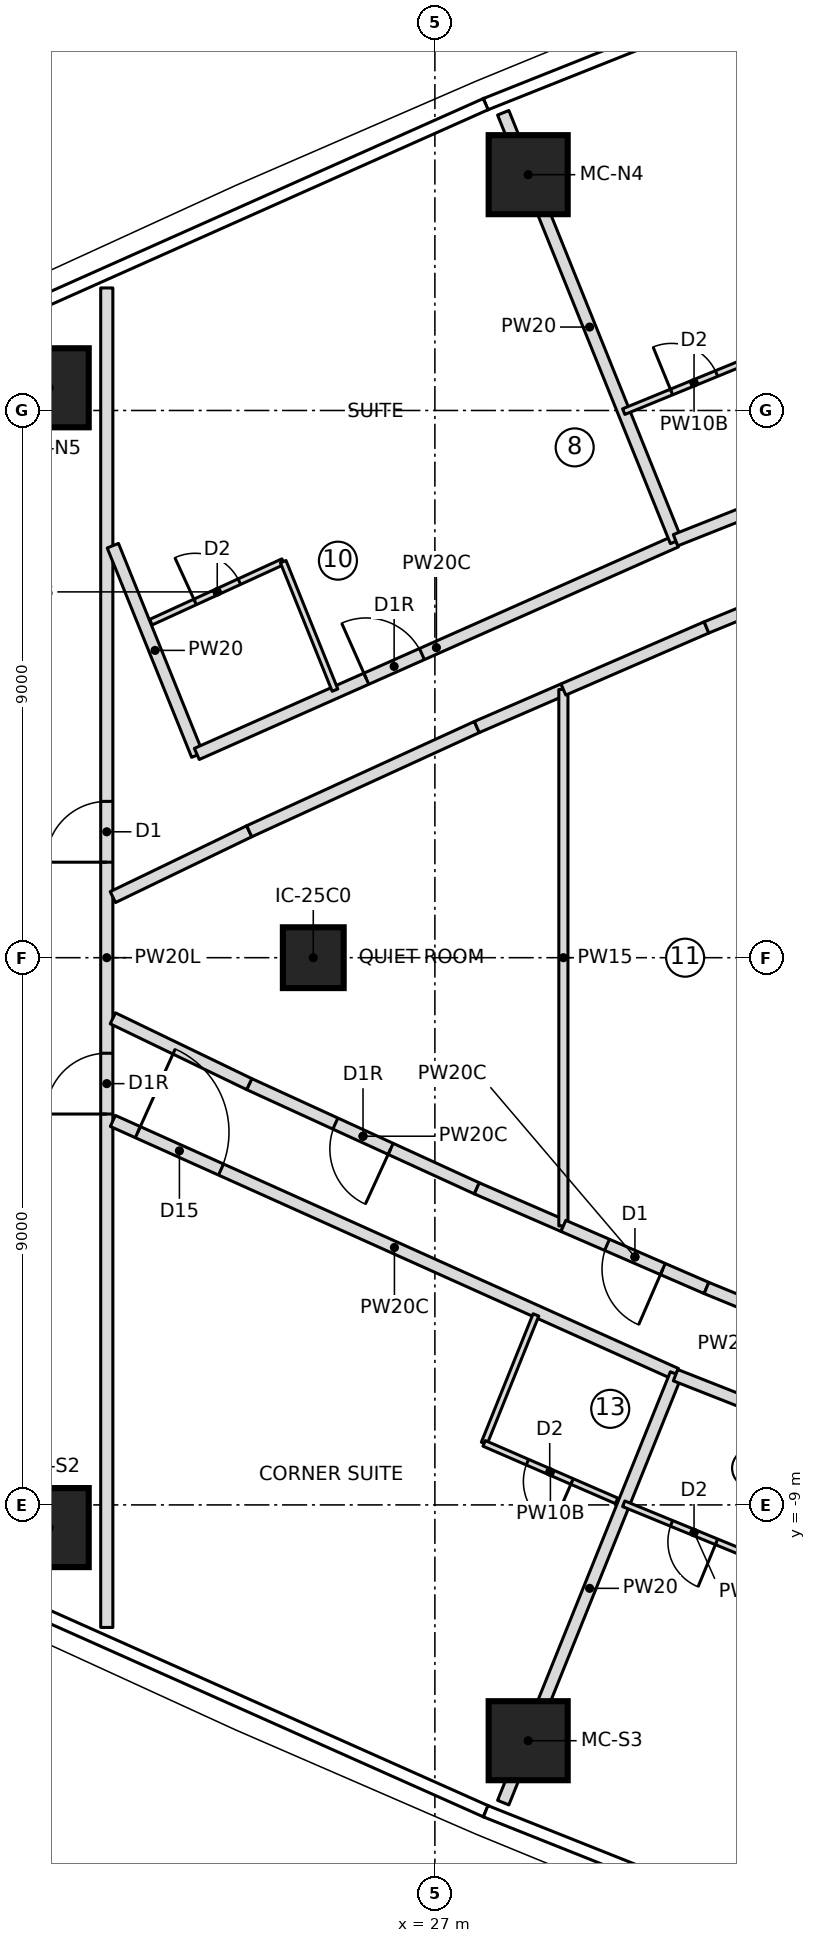
"""IFC4 building model, lengths in metres.
Left out: names, types, materials, properties, quantities, classifications, styles, units other than length and angle.
Written with IfcOpenShell. Run it as: python <this file> out.ifc"""

import sys

from ifc_helpers import new_model, si_unit, direction, frame, frame_2d, origin, origin_2d, place, context, subcontext, project, spatial, rectangle, extrude, element, fill, save


model = new_model("IFC4")
c1 = context("Model", 3, precision=1e-05, world=origin(), true_north=direction((0.0, 1.0)))
c2 = subcontext(c1, "Body", "Model", "MODEL_VIEW")
j1 = project(units=[si_unit("LENGTHUNIT", "METRE"), si_unit("PLANEANGLEUNIT", "RADIAN")], contexts=[c1])
p1 = place(None, origin())
s1 = spatial("IfcSite", under=j1, at=p1, CompositionType="ELEMENT")
p2 = place(p1, origin())
s2 = spatial("IfcBuilding", under=s1, at=p2, CompositionType="ELEMENT")
p3 = place(p2, frame((0.0, 0.0, 175.5)))
s3 = spatial("IfcBuildingStorey", under=s2, at=p3, CompositionType="ELEMENT", Elevation=175.5)
for number, where, z_axis, x_axis in (
    (1, (20.657, -9.373, 0.0), (0.0, 0.0, 1.0), (1.0, 0.0, 0.0)),
    (2, (28.534, -12.878, 0.0), (0.0, 0.0, 1.0), (1.0, 0.0, 0.0)),
    (3, (28.534, 12.878, 0.0), (0.0, 0.0, 1.0), (1.0, 0.0, 0.0)),
    (4, (20.657, 9.373, 0.0), (0.0, 0.0, 1.0), (1.0, 0.0, 0.0)),
):
    element("IfcColumn", number, at=place(p3, frame(where, z_axis=z_axis, x_axis=x_axis)), inside=s3, PredefinedType="COLUMN", context=c2, shape_type="SweptSolid", body=[
        extrude(rectangle(XDim=1.3, YDim=1.3, at=origin_2d()), origin(), (0.0, 0.0, 1.0), 3.55),
    ])
p4 = place(p3, frame((25.0, 0.0, 0.0), z_axis=(0.0, 0.0, 1.0), x_axis=(1.0, 0.0, 0.0)))
e5 = element("IfcColumn", 5, at=p4, inside=s3, PredefinedType="COLUMN", context=c2, shape_type="SweptSolid", body=[
    extrude(rectangle(XDim=1.0, YDim=1.0, at=origin_2d()), origin(), (0.0, 0.0, 1.0), 3.55),
])
p5 = place(p3, frame((21.604, -11.015, 0.0), z_axis=(0.0, 0.0, 1.0), x_axis=(0.0, 1.0, 0.0)))
e6 = element("IfcWall", 6, at=p5, inside=s3, PredefinedType="PARTITIONING", context=c2, shape_type="SweptSolid", body=[
    extrude(rectangle(XDim=22.031, YDim=0.2, at=frame_2d((11.015, 0.0))), origin(), (0.0, 0.0, 1.0), 3.25),
])
p6 = place(p5, frame((12.586, 0.0, 0.0)))
e7 = element("IfcOpeningElement", 7, at=p6, cuts=e6, PredefinedType="OPENING", context=c2, shape_type="SweptSolid", body=[
    extrude(rectangle(XDim=1.0, YDim=2.1, at=frame_2d((0.5, 1.05))), frame((0.0, 0.11, 0.0), z_axis=(0.0, -1.0, 0.0), x_axis=(1.0, 0.0, 0.0)), (0.0, 0.0, 1.0), 0.22),
])
p7 = place(p5, frame((8.444, 0.0, 0.0)))
e8 = element("IfcOpeningElement", 8, at=p7, cuts=e6, PredefinedType="OPENING", context=c2, shape_type="SweptSolid", body=[
    extrude(rectangle(XDim=1.0, YDim=2.1, at=frame_2d((0.5, 1.05))), frame((0.0, 0.11, 0.0), z_axis=(0.0, -1.0, 0.0), x_axis=(1.0, 0.0, 0.0)), (0.0, 0.0, 1.0), 0.22),
])
p8 = place(p3, frame((23.092, 3.333, 0.0), z_axis=(0.0, 0.0, 1.0), x_axis=(-0.373883495288, 0.927475677283, 0.0)))
e9 = element("IfcWall", 9, at=p8, inside=s3, PredefinedType="PARTITIONING", context=c2, shape_type="SweptSolid", body=[
    extrude(rectangle(XDim=3.713, YDim=0.2, at=frame_2d((1.856, 0.0))), origin(), (0.0, 0.0, 1.0), 3.25),
])
p9 = place(p3, frame((23.085, 3.351, 0.0), z_axis=(0.0, 0.0, 1.0), x_axis=(0.914065936171, 0.405565610392, 0.0)))
e10 = element("IfcWall", 10, at=p9, inside=s3, PredefinedType="PARTITIONING", context=c2, shape_type="SweptSolid", body=[
    extrude(rectangle(XDim=8.622, YDim=0.2, at=frame_2d((4.311, 0.0))), origin(), (0.0, 0.0, 1.0), 3.25),
])
p10 = place(p9, frame((3.05, 0.0, 0.0)))
e11 = element("IfcOpeningElement", 11, at=p10, cuts=e10, PredefinedType="OPENING", context=c2, shape_type="SweptSolid", body=[
    extrude(rectangle(XDim=1.0, YDim=2.1, at=frame_2d((0.5, 1.05))), frame((0.0, 0.11, 0.0), z_axis=(0.0, -1.0, 0.0), x_axis=(1.0, 0.0, 0.0)), (0.0, 0.0, 1.0), 0.22),
])
p11 = place(p3, frame((22.33, 5.518, 0.0), z_axis=(0.0, 0.0, 1.0), x_axis=(0.909209708064, 0.416338452178, 0.0)))
e12 = element("IfcWall", 12, at=p11, inside=s3, PredefinedType="PARTITIONING", context=c2, shape_type="SweptSolid", body=[
    extrude(rectangle(XDim=2.393, YDim=0.1, at=frame_2d((1.196, 0.0))), origin(), (0.0, 0.0, 1.0), 3.25),
])
p12 = place(p11, frame((0.8, 0.0, 0.0)))
e13 = element("IfcOpeningElement", 13, at=p12, cuts=e12, PredefinedType="OPENING", context=c2, shape_type="SweptSolid", body=[
    extrude(rectangle(XDim=0.8, YDim=2.1, at=frame_2d((0.4, 1.05))), frame((0.0, 0.06, 0.0), z_axis=(0.0, -1.0, 0.0), x_axis=(1.0, 0.0, 0.0)), (0.0, 0.0, 1.0), 0.12),
])
p13 = place(p3, frame((24.505, 6.514, 0.0), z_axis=(0.0, 0.0, 1.0), x_axis=(0.373919298041, -0.927461243693, 0.0)))
e14 = element("IfcWall", 14, at=p13, inside=s3, PredefinedType="PARTITIONING", context=c2, shape_type="SweptSolid", body=[
    extrude(rectangle(XDim=2.279, YDim=0.1, at=frame_2d((1.14, 0.0))), origin(), (0.0, 0.0, 1.0), 3.25),
])
p14 = place(p3, frame((30.965, 6.848, 0.0), z_axis=(0.0, 0.0, 1.0), x_axis=(-0.373876084216, 0.927478664796, 0.0)))
e15 = element("IfcWall", 15, at=p14, inside=s3, PredefinedType="PARTITIONING", context=c2, shape_type="SweptSolid", body=[
    extrude(rectangle(XDim=7.6, YDim=0.2, at=frame_2d((3.8, 0.0))), origin(), (0.0, 0.0, 1.0), 3.25),
])
p15 = place(p3, frame((38.972, 10.045, 0.0), z_axis=(0.0, 0.0, 1.0), x_axis=(-0.929554647243, -0.368684360651, 0.0)))
e16 = element("IfcWall", 16, at=p15, inside=s3, PredefinedType="PARTITIONING", context=c2, shape_type="SweptSolid", body=[
    extrude(rectangle(XDim=8.622, YDim=0.2, at=frame_2d((4.311, 0.0))), origin(), (0.0, 0.0, 1.0), 3.25),
])
p16 = place(p15, frame((0.35, 0.0, 0.0)))
e17 = element("IfcOpeningElement", 17, at=p16, cuts=e16, PredefinedType="OPENING", context=c2, shape_type="SweptSolid", body=[
    extrude(rectangle(XDim=1.0, YDim=2.1, at=frame_2d((0.5, 1.05))), frame((0.0, 0.11, 0.0), z_axis=(0.0, -1.0, 0.0), x_axis=(1.0, 0.0, 0.0)), (0.0, 0.0, 1.0), 0.22),
])
p17 = place(p3, frame((30.105, 8.981, 0.0), z_axis=(0.0, 0.0, 1.0), x_axis=(0.92519499486, 0.379492057212, 0.0)))
e18 = element("IfcWall", 18, at=p17, inside=s3, PredefinedType="PARTITIONING", context=c2, shape_type="SweptSolid", body=[
    extrude(rectangle(XDim=2.5, YDim=0.1, at=frame_2d((1.25, 0.0))), origin(), (0.0, 0.0, 1.0), 3.25),
])
p18 = place(p17, frame((0.85, 0.0, 0.0)))
e19 = element("IfcOpeningElement", 19, at=p18, cuts=e18, PredefinedType="OPENING", context=c2, shape_type="SweptSolid", body=[
    extrude(rectangle(XDim=0.8, YDim=2.1, at=frame_2d((0.4, 1.05))), frame((0.0, 0.06, 0.0), z_axis=(0.0, -1.0, 0.0), x_axis=(1.0, 0.0, 0.0)), (0.0, 0.0, 1.0), 0.12),
])
p19 = place(p3, frame((21.704, -2.685, 0.0), z_axis=(0.0, 0.0, 1.0), x_axis=(0.912095082087, -0.409978732659, 0.0)))
e20 = element("IfcWall", 20, at=p19, inside=s3, PredefinedType="PARTITIONING", context=c2, shape_type="SweptSolid", body=[
    extrude(rectangle(XDim=10.154, YDim=0.2, at=frame_2d((5.077, 0.0))), origin(), (0.0, 0.0, 1.0), 3.25),
])
p20 = place(p19, frame((0.45, 0.0, 0.0)))
e21 = element("IfcOpeningElement", 21, at=p20, cuts=e20, PredefinedType="OPENING", context=c2, shape_type="SweptSolid", body=[
    extrude(rectangle(XDim=1.5, YDim=2.1, at=frame_2d((0.75, 1.05))), frame((0.0, 0.11, 0.0), z_axis=(0.0, -1.0, 0.0), x_axis=(1.0, 0.0, 0.0)), (0.0, 0.0, 1.0), 0.22),
])
p21 = place(p3, frame((27.81, -7.988, 0.0), z_axis=(0.0, 0.0, 1.0), x_axis=(0.373865727953, 0.927482839443, 0.0)))
e22 = element("IfcWall", 22, at=p21, inside=s3, PredefinedType="PARTITIONING", context=c2, shape_type="SweptSolid", body=[
    extrude(rectangle(XDim=2.278, YDim=0.1, at=frame_2d((1.139, 0.0))), origin(), (0.0, 0.0, 1.0), 3.25),
])
p22 = place(p3, frame((29.989, -8.933, 0.0), z_axis=(0.0, 0.0, 1.0), x_axis=(-0.917386792713, 0.397996824805, 0.0)))
e23 = element("IfcWall", 23, at=p22, inside=s3, PredefinedType="PARTITIONING", context=c2, shape_type="SweptSolid", body=[
    extrude(rectangle(XDim=2.375, YDim=0.1, at=frame_2d((1.188, 0.0))), origin(), (0.0, 0.0, 1.0), 3.25),
])
p23 = place(p22, frame((0.8, 0.0, 0.0)))
e24 = element("IfcOpeningElement", 24, at=p23, cuts=e23, PredefinedType="OPENING", context=c2, shape_type="SweptSolid", body=[
    extrude(rectangle(XDim=0.8, YDim=2.1, at=frame_2d((0.4, 1.05))), frame((0.0, 0.06, 0.0), z_axis=(0.0, -1.0, 0.0), x_axis=(1.0, 0.0, 0.0)), (0.0, 0.0, 1.0), 0.12),
])
p24 = place(p3, frame((28.124, -13.897, 0.0), z_axis=(0.0, 0.0, 1.0), x_axis=(0.373876084216, 0.927478664796, 0.0)))
e25 = element("IfcWall", 25, at=p24, inside=s3, PredefinedType="PARTITIONING", context=c2, shape_type="SweptSolid", body=[
    extrude(rectangle(XDim=7.6, YDim=0.2, at=frame_2d((3.8, 0.0))), origin(), (0.0, 0.0, 1.0), 3.25),
])
p25 = place(p3, frame((30.958, -6.866, 0.0), z_axis=(0.0, 0.0, 1.0), x_axis=(0.93040517394, -0.366532689274, 0.0)))
e26 = element("IfcWall", 26, at=p25, inside=s3, PredefinedType="PARTITIONING", context=c2, shape_type="SweptSolid", body=[
    extrude(rectangle(XDim=8.622, YDim=0.2, at=frame_2d((4.311, 0.0))), origin(), (0.0, 0.0, 1.0), 3.25),
])
p26 = place(p25, frame((4.25, 0.0, 0.0)))
e27 = element("IfcOpeningElement", 27, at=p26, cuts=e26, PredefinedType="OPENING", context=c2, shape_type="SweptSolid", body=[
    extrude(rectangle(XDim=1.0, YDim=2.1, at=frame_2d((0.5, 1.05))), frame((0.0, 0.11, 0.0), z_axis=(0.0, -1.0, 0.0), x_axis=(1.0, 0.0, 0.0)), (0.0, 0.0, 1.0), 0.22),
])
p27 = place(p3, frame((32.418, -9.93, 0.0), z_axis=(0.0, 0.0, 1.0), x_axis=(-0.92519499486, 0.379492057212, 0.0)))
e28 = element("IfcWall", 28, at=p27, inside=s3, PredefinedType="PARTITIONING", context=c2, shape_type="SweptSolid", body=[
    extrude(rectangle(XDim=2.5, YDim=0.1, at=frame_2d((1.25, 0.0))), origin(), (0.0, 0.0, 1.0), 3.25),
])
p28 = place(p27, frame((0.85, 0.0, 0.0)))
e29 = element("IfcOpeningElement", 29, at=p28, cuts=e28, PredefinedType="OPENING", context=c2, shape_type="SweptSolid", body=[
    extrude(rectangle(XDim=0.8, YDim=2.1, at=frame_2d((0.4, 1.05))), frame((0.0, 0.06, 0.0), z_axis=(0.0, -1.0, 0.0), x_axis=(1.0, 0.0, 0.0)), (0.0, 0.0, 1.0), 0.12),
])
p29 = place(p3, frame((27.69, -3.793, 0.0), z_axis=(0.0, 0.0, 1.0), x_axis=(-0.909180834404, 0.416401501382, 0.0)))
e30 = element("IfcWall", 30, at=p29, inside=s3, PredefinedType="PARTITIONING", context=c2, shape_type="SweptSolid", body=[
    extrude(rectangle(XDim=4.117, YDim=0.2, at=frame_2d((2.059, 0.0))), origin(), (0.0, 0.0, 1.0), 3.25),
])
p30 = place(p29, frame((1.559, 0.0, 0.0)))
e31 = element("IfcOpeningElement", 31, at=p30, cuts=e30, PredefinedType="OPENING", context=c2, shape_type="SweptSolid", body=[
    extrude(rectangle(XDim=1.0, YDim=2.1, at=frame_2d((0.5, 1.05))), frame((0.0, 0.11, 0.0), z_axis=(0.0, -1.0, 0.0), x_axis=(1.0, 0.0, 0.0)), (0.0, 0.0, 1.0), 0.22),
])
for number, where, z_axis, x_axis in (
    (32, (23.947, -2.079, 0.0), (0.0, 0.0, 1.0), (-0.901, 0.435, 0.0)),
    (33, (21.704, 0.997, 0.0), (0.0, 0.0, 1.0), (0.901, 0.435, 0.0)),
):
    element("IfcWall", number, at=place(p3, frame(where, z_axis=z_axis, x_axis=x_axis)), inside=s3, PredefinedType="PARTITIONING", context=c2, shape_type="SweptSolid", body=[
        extrude(rectangle(XDim=2.49, YDim=0.2, at=frame_2d((1.245, 0.0))), origin(), (0.0, 0.0, 1.0), 3.25),
    ])
p31 = place(p3, frame((23.947, 2.079, 0.0), z_axis=(0.0, 0.0, 1.0), x_axis=(0.909180834404, 0.416401501382, 0.0)))
e34 = element("IfcWall", 34, at=p31, inside=s3, PredefinedType="PARTITIONING", context=c2, shape_type="SweptSolid", body=[
    extrude(rectangle(XDim=4.117, YDim=0.2, at=frame_2d((2.059, 0.0))), origin(), (0.0, 0.0, 1.0), 3.25),
])
for number, where, z_axis, x_axis in (
    (35, (27.69, 3.793, 0.0), (0.0, 0.0, 1.0), (0.917, 0.398, 0.0)),
    (36, (29.113, -4.411, 0.0), (0.0, 0.0, 1.0), (-0.917, 0.398, 0.0)),
):
    element("IfcWall", number, at=place(p3, frame(where, z_axis=z_axis, x_axis=x_axis)), inside=s3, PredefinedType="PARTITIONING", context=c2, shape_type="SweptSolid", body=[
        extrude(rectangle(XDim=1.552, YDim=0.2, at=frame_2d((0.776, 0.0))), origin(), (0.0, 0.0, 1.0), 3.25),
    ])
p32 = place(p3, frame((29.113, -4.411, 0.0), z_axis=(0.0, 0.0, 1.0), x_axis=(0.0, 1.0, 0.0)))
e37 = element("IfcWall", 37, at=p32, inside=s3, PredefinedType="PARTITIONING", context=c2, shape_type="SweptSolid", body=[
    extrude(rectangle(XDim=8.822, YDim=0.15, at=frame_2d((4.411, 0.0))), origin(), (0.0, 0.0, 1.0), 3.25),
])
p33 = place(p3, frame((31.467, -5.432, 0.0), z_axis=(0.0, 0.0, 1.0), x_axis=(-0.91737845263, 0.398016048231, 0.0)))
e38 = element("IfcWall", 38, at=p33, inside=s3, PredefinedType="PARTITIONING", context=c2, shape_type="SweptSolid", body=[
    extrude(rectangle(XDim=2.565, YDim=0.2, at=frame_2d((1.283, 0.0))), origin(), (0.0, 0.0, 1.0), 3.25),
])
p34 = place(p33, frame((0.783, 0.0, 0.0)))
e39 = element("IfcOpeningElement", 39, at=p34, cuts=e38, PredefinedType="OPENING", context=c2, shape_type="SweptSolid", body=[
    extrude(rectangle(XDim=1.0, YDim=2.1, at=frame_2d((0.5, 1.05))), frame((0.0, 0.11, 0.0), z_axis=(0.0, -1.0, 0.0), x_axis=(1.0, 0.0, 0.0)), (0.0, 0.0, 1.0), 0.22),
])
p35 = place(p3, frame((32.113, -5.697, 0.0), z_axis=(0.0, 0.0, 1.0), x_axis=(-0.92526293873, 0.379326368992, 0.0)))
e40 = element("IfcWall", 40, at=p35, inside=s3, PredefinedType="PARTITIONING", context=c2, shape_type="SweptSolid", body=[
    extrude(rectangle(XDim=0.699, YDim=0.2, at=frame_2d((0.35, 0.0))), origin(), (0.0, 0.0, 1.0), 3.25),
])
p36 = place(p3, frame((29.113, 4.411, 0.0), z_axis=(0.0, 0.0, 1.0), x_axis=(0.91737845263, 0.398016048231, 0.0)))
e41 = element("IfcWall", 41, at=p36, inside=s3, PredefinedType="PARTITIONING", context=c2, shape_type="SweptSolid", body=[
    extrude(rectangle(XDim=2.565, YDim=0.2, at=frame_2d((1.283, 0.0))), origin(), (0.0, 0.0, 1.0), 3.25),
])
p37 = place(p3, frame((31.467, 5.432, 0.0), z_axis=(0.0, 0.0, 1.0), x_axis=(0.92526293873, 0.379326368992, 0.0)))
e42 = element("IfcWall", 42, at=p37, inside=s3, PredefinedType="PARTITIONING", context=c2, shape_type="SweptSolid", body=[
    extrude(rectangle(XDim=0.699, YDim=0.2, at=frame_2d((0.35, 0.0))), origin(), (0.0, 0.0, 1.0), 3.25),
])
p38 = place(p6, origin())
e43 = element("IfcDoor", 43, at=p38, inside=s3, OperationType="SINGLE_SWING_LEFT", PredefinedType="DOOR", context=c2, shape_type="SweptSolid", body=[
    extrude(rectangle(XDim=1.0, YDim=2.1, at=frame_2d((0.5, 1.05))), frame((0.0, 0.025, 0.0), z_axis=(0.0, -1.0, 0.0), x_axis=(1.0, 0.0, 0.0)), (0.0, 0.0, 1.0), 0.05),
])
fill(e7, e43)
p39 = place(p7, origin())
e44 = element("IfcDoor", 44, at=p39, inside=s3, OperationType="SINGLE_SWING_RIGHT", PredefinedType="DOOR", context=c2, shape_type="SweptSolid", body=[
    extrude(rectangle(XDim=1.0, YDim=2.1, at=frame_2d((0.5, 1.05))), frame((0.0, 0.025, 0.0), z_axis=(0.0, -1.0, 0.0), x_axis=(1.0, 0.0, 0.0)), (0.0, 0.0, 1.0), 0.05),
])
fill(e8, e44)
p40 = place(p12, origin())
e45 = element("IfcDoor", 45, at=p40, inside=s3, OperationType="SINGLE_SWING_LEFT", PredefinedType="DOOR", context=c2, shape_type="SweptSolid", body=[
    extrude(rectangle(XDim=0.8, YDim=2.1, at=frame_2d((0.4, 1.05))), frame((0.0, 0.025, 0.0), z_axis=(0.0, -1.0, 0.0), x_axis=(1.0, 0.0, 0.0)), (0.0, 0.0, 1.0), 0.05),
])
fill(e13, e45)
p41 = place(p10, origin())
e46 = element("IfcDoor", 46, at=p41, inside=s3, OperationType="SINGLE_SWING_RIGHT", PredefinedType="DOOR", context=c2, shape_type="SweptSolid", body=[
    extrude(rectangle(XDim=1.0, YDim=2.1, at=frame_2d((0.5, 1.05))), frame((0.0, 0.025, 0.0), z_axis=(0.0, -1.0, 0.0), x_axis=(1.0, 0.0, 0.0)), (0.0, 0.0, 1.0), 0.05),
])
fill(e11, e46)
p42 = place(p18, origin())
e47 = element("IfcDoor", 47, at=p42, inside=s3, OperationType="SINGLE_SWING_LEFT", PredefinedType="DOOR", context=c2, shape_type="SweptSolid", body=[
    extrude(rectangle(XDim=0.8, YDim=2.1, at=frame_2d((0.4, 1.05))), frame((0.0, 0.025, 0.0), z_axis=(0.0, -1.0, 0.0), x_axis=(1.0, 0.0, 0.0)), (0.0, 0.0, 1.0), 0.05),
])
fill(e19, e47)
p43 = place(p23, origin())
e48 = element("IfcDoor", 48, at=p43, inside=s3, OperationType="SINGLE_SWING_LEFT", PredefinedType="DOOR", context=c2, shape_type="SweptSolid", body=[
    extrude(rectangle(XDim=0.8, YDim=2.1, at=frame_2d((0.4, 1.05))), frame((0.0, 0.025, 0.0), z_axis=(0.0, -1.0, 0.0), x_axis=(1.0, 0.0, 0.0)), (0.0, 0.0, 1.0), 0.05),
])
fill(e24, e48)
p44 = place(p20, origin())
e49 = element("IfcDoor", 49, at=p44, inside=s3, OperationType="DOUBLE_DOOR_SINGLE_SWING", PredefinedType="DOOR", context=c2, shape_type="SweptSolid", body=[
    extrude(rectangle(XDim=1.5, YDim=2.1, at=frame_2d((0.75, 1.05))), frame((0.0, 0.025, 0.0), z_axis=(0.0, -1.0, 0.0), x_axis=(1.0, 0.0, 0.0)), (0.0, 0.0, 1.0), 0.05),
])
fill(e21, e49)
p45 = place(p28, origin())
e50 = element("IfcDoor", 50, at=p45, inside=s3, OperationType="SINGLE_SWING_LEFT", PredefinedType="DOOR", context=c2, shape_type="SweptSolid", body=[
    extrude(rectangle(XDim=0.8, YDim=2.1, at=frame_2d((0.4, 1.05))), frame((0.0, 0.025, 0.0), z_axis=(0.0, -1.0, 0.0), x_axis=(1.0, 0.0, 0.0)), (0.0, 0.0, 1.0), 0.05),
])
fill(e29, e50)
p46 = place(p30, origin())
e51 = element("IfcDoor", 51, at=p46, inside=s3, OperationType="SINGLE_SWING_RIGHT", PredefinedType="DOOR", context=c2, shape_type="SweptSolid", body=[
    extrude(rectangle(XDim=1.0, YDim=2.1, at=frame_2d((0.5, 1.05))), frame((0.0, 0.025, 0.0), z_axis=(0.0, -1.0, 0.0), x_axis=(1.0, 0.0, 0.0)), (0.0, 0.0, 1.0), 0.05),
])
fill(e31, e51)
p47 = place(p34, origin())
e52 = element("IfcDoor", 52, at=p47, inside=s3, OperationType="SINGLE_SWING_LEFT", PredefinedType="DOOR", context=c2, shape_type="SweptSolid", body=[
    extrude(rectangle(XDim=1.0, YDim=2.1, at=frame_2d((0.5, 1.05))), frame((0.0, 0.025, 0.0), z_axis=(0.0, -1.0, 0.0), x_axis=(1.0, 0.0, 0.0)), (0.0, 0.0, 1.0), 0.05),
])
fill(e39, e52)
save(model, sys.argv[1])
